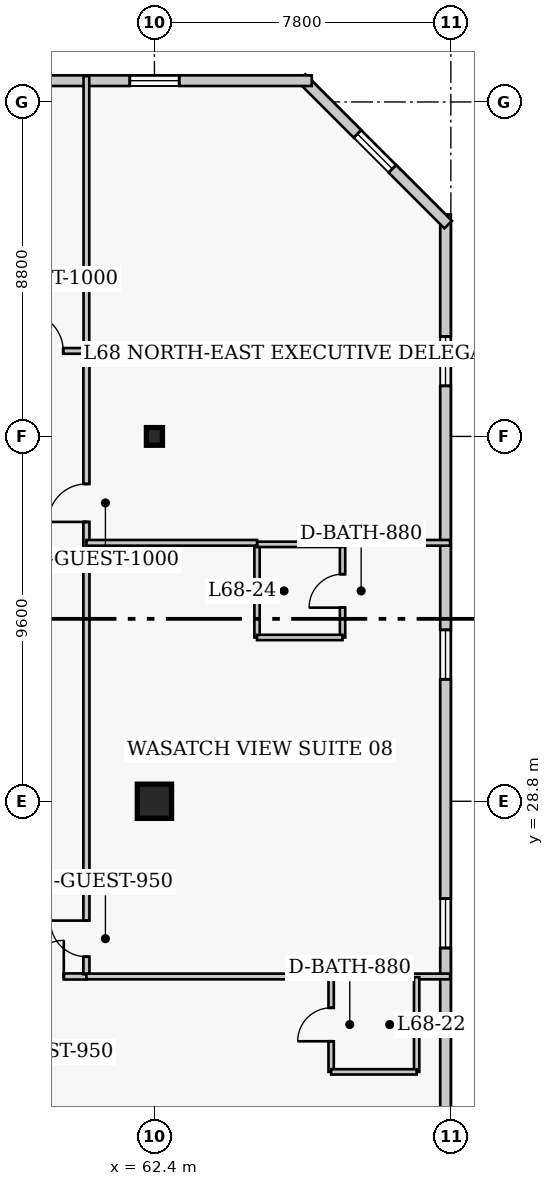
"""IFC4 building model, lengths in metres.
Left out: names, types, materials, properties, quantities, classifications, styles, units other than length and angle.
Written with IfcOpenShell. Run it as: python <this file> out.ifc"""

import sys

from ifc_helpers import new_model, si_unit, direction, frame, frame_2d, origin, origin_2d, place, context, subcontext, project, spatial, rectangle, i_section, extrude, element, fill, save


model = new_model("IFC4")
c1 = context("Model", 3, precision=1e-05, world=origin(), true_north=direction((0.0, 1.0)))
c2 = subcontext(c1, "Body", "Model", "MODEL_VIEW")
j1 = project(units=[si_unit("LENGTHUNIT", "METRE"), si_unit("PLANEANGLEUNIT", "RADIAN")], contexts=[c1])
p1 = place(None, origin())
s1 = spatial("IfcSite", under=j1, at=p1, CompositionType="ELEMENT")
p2 = place(p1, origin())
s2 = spatial("IfcBuilding", under=s1, at=p2, CompositionType="ELEMENT")
p3 = place(p2, frame((0.0, 0.0, 273.4)))
s3 = spatial("IfcBuildingStorey", under=s2, at=p3, CompositionType="ELEMENT", Elevation=273.4)
p4 = place(p3, frame((62.4, 28.8, 0.0), z_axis=(0.0, 0.0, 1.0), x_axis=(1.0, 0.0, 0.0)))
e1 = element("IfcColumn", 1, at=p4, inside=s3, PredefinedType="COLUMN", context=c2, shape_type="SweptSolid", body=[
    extrude(rectangle(XDim=0.9, YDim=0.9, at=origin_2d()), origin(), (0.0, 0.0, 1.0), 4.0),
])
p5 = place(p3, frame((62.4, 38.4, 0.0), z_axis=(0.0, 0.0, 1.0), x_axis=(1.0, 0.0, 0.0)))
e2 = element("IfcColumn", 2, at=p5, inside=s3, PredefinedType="COLUMN", context=c2, shape_type="SweptSolid", body=[
    extrude(i_section(OverallWidth=0.422, OverallDepth=0.465, WebThickness=0.045, FlangeThickness=0.073, FilletRadius=0.017, at=origin_2d()), origin(), (0.0, 0.0, 1.0), 4.0),
])
p6 = place(p3, frame((70.06, 13.36, 0.0), z_axis=(0.0, 0.0, 1.0), x_axis=(0.0, 1.0, 0.0)))
e3 = element("IfcWall", 3, at=p6, inside=s3, PredefinedType="SOLIDWALL", context=c2, shape_type="SweptSolid", body=[
    extrude(rectangle(XDim=30.88, YDim=0.28, at=frame_2d((15.44, 0.0))), origin(), (0.0, 0.0, 1.0), 3.76),
])
p7 = place(p6, frame((3.21, 0.0, 0.85)))
e4 = element("IfcOpeningElement", 4, at=p7, cuts=e3, PredefinedType="OPENING", context=c2, shape_type="SweptSolid", body=[
    extrude(rectangle(XDim=1.3, YDim=1.7, at=frame_2d((0.65, 0.85))), frame((0.0, 0.15, 0.0), z_axis=(0.0, -1.0, 0.0), x_axis=(1.0, 0.0, 0.0)), (0.0, 0.0, 1.0), 0.3),
])
p8 = place(p6, frame((11.58, 0.0, 0.85)))
e5 = element("IfcOpeningElement", 5, at=p8, cuts=e3, PredefinedType="OPENING", context=c2, shape_type="SweptSolid", body=[
    extrude(rectangle(XDim=1.3, YDim=1.7, at=frame_2d((0.65, 0.85))), frame((0.0, 0.15, 0.0), z_axis=(0.0, -1.0, 0.0), x_axis=(1.0, 0.0, 0.0)), (0.0, 0.0, 1.0), 0.3),
])
p9 = place(p6, frame((18.65, 0.0, 0.85)))
e6 = element("IfcOpeningElement", 6, at=p9, cuts=e3, PredefinedType="OPENING", context=c2, shape_type="SweptSolid", body=[
    extrude(rectangle(XDim=1.3, YDim=1.7, at=frame_2d((0.65, 0.85))), frame((0.0, 0.15, 0.0), z_axis=(0.0, -1.0, 0.0), x_axis=(1.0, 0.0, 0.0)), (0.0, 0.0, 1.0), 0.3),
])
p10 = place(p6, frame((26.37, 0.0, 0.85)))
e7 = element("IfcOpeningElement", 7, at=p10, cuts=e3, PredefinedType="OPENING", context=c2, shape_type="SweptSolid", body=[
    extrude(rectangle(XDim=1.3, YDim=1.7, at=frame_2d((0.65, 0.85))), frame((0.0, 0.15, 0.0), z_axis=(0.0, -1.0, 0.0), x_axis=(1.0, 0.0, 0.0)), (0.0, 0.0, 1.0), 0.3),
])
p11 = place(p3, frame((70.129, 43.973, 0.0), z_axis=(0.0, 0.0, 1.0), x_axis=(-0.707106781187, 0.707106781187, 0.0)))
e8 = element("IfcWall", 8, at=p11, inside=s3, PredefinedType="SOLIDWALL", context=c2, shape_type="SweptSolid", body=[
    extrude(rectangle(XDim=5.454, YDim=0.28, at=frame_2d((2.727, 0.0))), origin(), (0.0, 0.0, 1.0), 3.76),
])
p12 = place(p11, frame((2.077, 0.0, 0.85)))
e9 = element("IfcOpeningElement", 9, at=p12, cuts=e8, PredefinedType="OPENING", context=c2, shape_type="SweptSolid", body=[
    extrude(rectangle(XDim=1.3, YDim=1.7, at=frame_2d((0.65, 0.85))), frame((0.0, 0.15, 0.0), z_axis=(0.0, -1.0, 0.0), x_axis=(1.0, 0.0, 0.0)), (0.0, 0.0, 1.0), 0.3),
])
p13 = place(p3, frame((66.54, 47.76, 0.0), z_axis=(0.0, 0.0, 1.0), x_axis=(-1.0, 0.0, 0.0)))
e10 = element("IfcWall", 10, at=p13, inside=s3, PredefinedType="SOLIDWALL", context=c2, shape_type="SweptSolid", body=[
    extrude(rectangle(XDim=24.83, YDim=0.28, at=frame_2d((12.415, 0.0))), origin(), (0.0, 0.0, 1.0), 3.76),
])
p14 = place(p13, frame((3.488, 0.0, 0.85)))
e11 = element("IfcOpeningElement", 11, at=p14, cuts=e10, PredefinedType="OPENING", context=c2, shape_type="SweptSolid", body=[
    extrude(rectangle(XDim=1.3, YDim=1.7, at=frame_2d((0.65, 0.85))), frame((0.0, 0.15, 0.0), z_axis=(0.0, -1.0, 0.0), x_axis=(1.0, 0.0, 0.0)), (0.0, 0.0, 1.0), 0.3),
])
p15 = place(p13, frame((12.915, 0.0, 0.85)))
e12 = element("IfcOpeningElement", 12, at=p15, cuts=e10, PredefinedType="OPENING", context=c2, shape_type="SweptSolid", body=[
    extrude(rectangle(XDim=1.3, YDim=1.7, at=frame_2d((0.65, 0.85))), frame((0.0, 0.15, 0.0), z_axis=(0.0, -1.0, 0.0), x_axis=(1.0, 0.0, 0.0)), (0.0, 0.0, 1.0), 0.3),
])
p16 = place(p13, frame((20.692, 0.0, 0.85)))
e13 = element("IfcOpeningElement", 13, at=p16, cuts=e10, PredefinedType="OPENING", context=c2, shape_type="SweptSolid", body=[
    extrude(rectangle(XDim=1.3, YDim=1.7, at=frame_2d((0.65, 0.85))), frame((0.0, 0.15, 0.0), z_axis=(0.0, -1.0, 0.0), x_axis=(1.0, 0.0, 0.0)), (0.0, 0.0, 1.0), 0.3),
])
p17 = place(p3, frame((35.8, 24.19, 0.0), z_axis=(0.0, 0.0, 1.0), x_axis=(1.0, 0.0, 0.0)))
e14 = element("IfcWall", 14, at=p17, inside=s3, PredefinedType="PARTITIONING", context=c2, shape_type="SweptSolid", body=[
    extrude(rectangle(XDim=24.81, YDim=0.16, at=frame_2d((12.405, 0.0))), origin(), (0.0, 0.0, 1.0), 3.76),
])
p18 = place(p17, frame((2.115, 0.0, 0.0)))
e15 = element("IfcOpeningElement", 15, at=p18, cuts=e14, PredefinedType="OPENING", context=c2, shape_type="SweptSolid", body=[
    extrude(rectangle(XDim=0.95, YDim=2.1, at=frame_2d((0.475, 1.05))), frame((0.0, 0.09, 0.0), z_axis=(0.0, -1.0, 0.0), x_axis=(1.0, 0.0, 0.0)), (0.0, 0.0, 1.0), 0.18),
])
p19 = place(p17, frame((11.345, 0.0, 0.0)))
e16 = element("IfcOpeningElement", 16, at=p19, cuts=e14, PredefinedType="OPENING", context=c2, shape_type="SweptSolid", body=[
    extrude(rectangle(XDim=1.0, YDim=2.15, at=frame_2d((0.5, 1.075))), frame((0.0, 0.09, 0.0), z_axis=(0.0, -1.0, 0.0), x_axis=(1.0, 0.0, 0.0)), (0.0, 0.0, 1.0), 0.18),
])
p20 = place(p17, frame((17.47, 0.0, 0.0)))
e17 = element("IfcOpeningElement", 17, at=p20, cuts=e14, PredefinedType="OPENING", context=c2, shape_type="SweptSolid", body=[
    extrude(rectangle(XDim=0.95, YDim=2.1, at=frame_2d((0.475, 1.05))), frame((0.0, 0.09, 0.0), z_axis=(0.0, -1.0, 0.0), x_axis=(1.0, 0.0, 0.0)), (0.0, 0.0, 1.0), 0.18),
])
p21 = place(p17, frame((23.265, 0.0, 0.0)))
e18 = element("IfcOpeningElement", 18, at=p21, cuts=e14, PredefinedType="OPENING", context=c2, shape_type="SweptSolid", body=[
    extrude(rectangle(XDim=0.95, YDim=2.1, at=frame_2d((0.475, 1.05))), frame((0.0, 0.09, 0.0), z_axis=(0.0, -1.0, 0.0), x_axis=(1.0, 0.0, 0.0)), (0.0, 0.0, 1.0), 0.18),
])
p22 = place(p3, frame((60.61, 24.25, 0.0), z_axis=(0.0, 0.0, 1.0), x_axis=(0.0, 1.0, 0.0)))
e19 = element("IfcWall", 19, at=p22, inside=s3, PredefinedType="PARTITIONING", context=c2, shape_type="SweptSolid", body=[
    extrude(rectangle(XDim=16.4, YDim=0.16, at=frame_2d((8.2, 0.0))), origin(), (0.0, 0.0, 1.0), 3.76),
])
p23 = place(p22, frame((0.46, 0.0, 0.0)))
e20 = element("IfcOpeningElement", 20, at=p23, cuts=e19, PredefinedType="OPENING", context=c2, shape_type="SweptSolid", body=[
    extrude(rectangle(XDim=0.95, YDim=2.1, at=frame_2d((0.475, 1.05))), frame((0.0, 0.09, 0.0), z_axis=(0.0, -1.0, 0.0), x_axis=(1.0, 0.0, 0.0)), (0.0, 0.0, 1.0), 0.18),
])
p24 = place(p22, frame((11.9, 0.0, 0.0)))
e21 = element("IfcOpeningElement", 21, at=p24, cuts=e19, PredefinedType="OPENING", context=c2, shape_type="SweptSolid", body=[
    extrude(rectangle(XDim=1.0, YDim=2.15, at=frame_2d((0.5, 1.075))), frame((0.0, 0.09, 0.0), z_axis=(0.0, -1.0, 0.0), x_axis=(1.0, 0.0, 0.0)), (0.0, 0.0, 1.0), 0.18),
])
p25 = place(p3, frame((56.8, 40.65, 0.0), z_axis=(0.0, 0.0, 1.0), x_axis=(1.0, 0.0, 0.0)))
e22 = element("IfcWall", 22, at=p25, inside=s3, PredefinedType="PARTITIONING", context=c2, shape_type="SweptSolid", body=[
    extrude(rectangle(XDim=3.81, YDim=0.15, at=frame_2d((1.905, 0.0))), origin(), (0.0, 0.0, 1.0), 3.76),
])
p26 = place(p25, frame((2.2, 0.0, 0.0)))
e23 = element("IfcOpeningElement", 23, at=p26, cuts=e22, PredefinedType="OPENING", context=c2, shape_type="SweptSolid", body=[
    extrude(rectangle(XDim=1.0, YDim=2.15, at=frame_2d((0.5, 1.075))), frame((0.0, 0.085, 0.0), z_axis=(0.0, -1.0, 0.0), x_axis=(1.0, 0.0, 0.0)), (0.0, 0.0, 1.0), 0.17),
])
p27 = place(p3, frame((60.61, 40.65, 0.0), z_axis=(0.0, 0.0, 1.0), x_axis=(0.0, 1.0, 0.0)))
e24 = element("IfcWall", 24, at=p27, inside=s3, PredefinedType="PARTITIONING", context=c2, shape_type="SweptSolid", body=[
    extrude(rectangle(XDim=7.23, YDim=0.15, at=frame_2d((3.615, 0.0))), origin(), (0.0, 0.0, 1.0), 3.76),
])
p28 = place(p3, frame((60.61, 24.19, 0.0), z_axis=(0.0, 0.0, 1.0), x_axis=(1.0, 0.0, 0.0)))
e25 = element("IfcWall", 25, at=p28, inside=s3, PredefinedType="PARTITIONING", context=c2, shape_type="SweptSolid", body=[
    extrude(rectangle(XDim=9.57, YDim=0.15, at=frame_2d((4.785, 0.0))), origin(), (0.0, 0.0, 1.0), 3.76),
])
p29 = place(p3, frame((67.05, 21.68, 0.0), z_axis=(0.0, 0.0, 1.0), x_axis=(0.0, 1.0, 0.0)))
e26 = element("IfcWall", 26, at=p29, inside=s3, PredefinedType="PLUMBINGWALL", context=c2, shape_type="SweptSolid", body=[
    extrude(rectangle(XDim=2.49, YDim=0.14, at=frame_2d((1.245, 0.0))), origin(), (0.0, 0.0, 1.0), 3.76),
])
p30 = place(p29, frame((0.805, 0.0, 0.0)))
e27 = element("IfcOpeningElement", 27, at=p30, cuts=e26, PredefinedType="OPENING", context=c2, shape_type="SweptSolid", body=[
    extrude(rectangle(XDim=0.88, YDim=2.05, at=frame_2d((0.44, 1.025))), frame((0.0, 0.08, 0.0), z_axis=(0.0, -1.0, 0.0), x_axis=(1.0, 0.0, 0.0)), (0.0, 0.0, 1.0), 0.16),
])
p31 = place(p3, frame((69.3, 21.68, 0.0), z_axis=(0.0, 0.0, 1.0), x_axis=(0.0, 1.0, 0.0)))
e28 = element("IfcWall", 28, at=p31, inside=s3, PredefinedType="PLUMBINGWALL", context=c2, shape_type="SweptSolid", body=[
    extrude(rectangle(XDim=2.49, YDim=0.14, at=frame_2d((1.245, 0.0))), origin(), (0.0, 0.0, 1.0), 3.76),
])
p32 = place(p3, frame((67.05, 21.68, 0.0), z_axis=(0.0, 0.0, 1.0), x_axis=(1.0, 0.0, 0.0)))
e29 = element("IfcWall", 29, at=p32, inside=s3, PredefinedType="PLUMBINGWALL", context=c2, shape_type="SweptSolid", body=[
    extrude(rectangle(XDim=2.25, YDim=0.14, at=frame_2d((1.125, 0.0))), origin(), (0.0, 0.0, 1.0), 3.76),
])
p33 = place(p3, frame((65.1, 33.11, 0.0), z_axis=(0.0, 0.0, 1.0), x_axis=(0.0, 1.0, 0.0)))
e30 = element("IfcWall", 30, at=p33, inside=s3, PredefinedType="PLUMBINGWALL", context=c2, shape_type="SweptSolid", body=[
    extrude(rectangle(XDim=2.45, YDim=0.14, at=frame_2d((1.225, 0.0))), origin(), (0.0, 0.0, 1.0), 3.76),
])
p34 = place(p3, frame((67.35, 33.11, 0.0), z_axis=(0.0, 0.0, 1.0), x_axis=(0.0, 1.0, 0.0)))
e31 = element("IfcWall", 31, at=p34, inside=s3, PredefinedType="PLUMBINGWALL", context=c2, shape_type="SweptSolid", body=[
    extrude(rectangle(XDim=2.45, YDim=0.14, at=frame_2d((1.225, 0.0))), origin(), (0.0, 0.0, 1.0), 3.76),
])
p35 = place(p34, frame((0.785, 0.0, 0.0)))
e32 = element("IfcOpeningElement", 32, at=p35, cuts=e31, PredefinedType="OPENING", context=c2, shape_type="SweptSolid", body=[
    extrude(rectangle(XDim=0.88, YDim=2.05, at=frame_2d((0.44, 1.025))), frame((0.0, 0.08, 0.0), z_axis=(0.0, -1.0, 0.0), x_axis=(1.0, 0.0, 0.0)), (0.0, 0.0, 1.0), 0.16),
])
for number, where, z_axis, x_axis in (
    (33, (65.1, 33.11, 0.0), (0.0, 0.0, 1.0), (1.0, 0.0, 0.0)),
    (34, (65.1, 35.56, 0.0), (0.0, 0.0, 1.0), (1.0, 0.0, 0.0)),
):
    element("IfcWall", number, at=place(p3, frame(where, z_axis=z_axis, x_axis=x_axis)), inside=s3, PredefinedType="PLUMBINGWALL", context=c2, shape_type="SweptSolid", body=[
        extrude(rectangle(XDim=2.25, YDim=0.14, at=frame_2d((1.125, 0.0))), origin(), (0.0, 0.0, 1.0), 3.76),
    ])
p36 = place(p3, frame((60.61, 35.6, 0.0), z_axis=(0.0, 0.0, 1.0), x_axis=(1.0, 0.0, 0.0)))
e35 = element("IfcWall", 35, at=p36, inside=s3, PredefinedType="PARTITIONING", context=c2, shape_type="SweptSolid", body=[
    extrude(rectangle(XDim=4.49, YDim=0.15, at=frame_2d((2.245, 0.0))), origin(), (0.0, 0.0, 1.0), 3.76),
])
p37 = place(p3, frame((67.35, 35.6, 0.0), z_axis=(0.0, 0.0, 1.0), x_axis=(1.0, 0.0, 0.0)))
e36 = element("IfcWall", 36, at=p37, inside=s3, PredefinedType="PARTITIONING", context=c2, shape_type="SweptSolid", body=[
    extrude(rectangle(XDim=2.83, YDim=0.15, at=frame_2d((1.415, 0.0))), origin(), (0.0, 0.0, 1.0), 3.76),
])
p38 = place(p8, origin())
e37 = element("IfcWindow", 37, at=p38, inside=s3, PartitioningType="SINGLE_PANEL", PredefinedType="WINDOW", context=c2, shape_type="SweptSolid", body=[
    extrude(rectangle(XDim=1.3, YDim=1.7, at=frame_2d((0.65, 0.85))), frame((0.0, 0.03, 0.0), z_axis=(0.0, -1.0, 0.0), x_axis=(1.0, 0.0, 0.0)), (0.0, 0.0, 1.0), 0.06),
])
fill(e5, e37)
p39 = place(p9, origin())
e38 = element("IfcWindow", 38, at=p39, inside=s3, PartitioningType="SINGLE_PANEL", PredefinedType="WINDOW", context=c2, shape_type="SweptSolid", body=[
    extrude(rectangle(XDim=1.3, YDim=1.7, at=frame_2d((0.65, 0.85))), frame((0.0, 0.03, 0.0), z_axis=(0.0, -1.0, 0.0), x_axis=(1.0, 0.0, 0.0)), (0.0, 0.0, 1.0), 0.06),
])
fill(e6, e38)
p40 = place(p10, origin())
e39 = element("IfcWindow", 39, at=p40, inside=s3, PartitioningType="SINGLE_PANEL", PredefinedType="WINDOW", context=c2, shape_type="SweptSolid", body=[
    extrude(rectangle(XDim=1.3, YDim=1.7, at=frame_2d((0.65, 0.85))), frame((0.0, 0.03, 0.0), z_axis=(0.0, -1.0, 0.0), x_axis=(1.0, 0.0, 0.0)), (0.0, 0.0, 1.0), 0.06),
])
fill(e7, e39)
p41 = place(p12, origin())
e40 = element("IfcWindow", 40, at=p41, inside=s3, PartitioningType="SINGLE_PANEL", PredefinedType="WINDOW", context=c2, shape_type="SweptSolid", body=[
    extrude(rectangle(XDim=1.3, YDim=1.7, at=frame_2d((0.65, 0.85))), frame((0.0, 0.03, 0.0), z_axis=(0.0, -1.0, 0.0), x_axis=(1.0, 0.0, 0.0)), (0.0, 0.0, 1.0), 0.06),
])
fill(e9, e40)
p42 = place(p14, origin())
e41 = element("IfcWindow", 41, at=p42, inside=s3, PartitioningType="SINGLE_PANEL", PredefinedType="WINDOW", context=c2, shape_type="SweptSolid", body=[
    extrude(rectangle(XDim=1.3, YDim=1.7, at=frame_2d((0.65, 0.85))), frame((0.0, 0.03, 0.0), z_axis=(0.0, -1.0, 0.0), x_axis=(1.0, 0.0, 0.0)), (0.0, 0.0, 1.0), 0.06),
])
fill(e11, e41)
p43 = place(p26, origin())
e42 = element("IfcDoor", 42, at=p43, inside=s3, OperationType="SINGLE_SWING_LEFT", PredefinedType="DOOR", context=c2, shape_type="SweptSolid", body=[
    extrude(rectangle(XDim=1.0, YDim=2.15, at=frame_2d((0.5, 1.075))), frame((0.0, 0.025, 0.0), z_axis=(0.0, -1.0, 0.0), x_axis=(1.0, 0.0, 0.0)), (0.0, 0.0, 1.0), 0.05),
])
fill(e23, e42)
p44 = place(p30, origin())
e43 = element("IfcDoor", 43, at=p44, inside=s3, OperationType="SINGLE_SWING_LEFT", PredefinedType="DOOR", context=c2, shape_type="SweptSolid", body=[
    extrude(rectangle(XDim=0.88, YDim=2.05, at=frame_2d((0.44, 1.025))), frame((0.0, 0.025, 0.0), z_axis=(0.0, -1.0, 0.0), x_axis=(1.0, 0.0, 0.0)), (0.0, 0.0, 1.0), 0.05),
])
fill(e27, e43)
p45 = place(p21, origin())
e44 = element("IfcDoor", 44, at=p45, inside=s3, OperationType="SINGLE_SWING_RIGHT", PredefinedType="DOOR", context=c2, shape_type="SweptSolid", body=[
    extrude(rectangle(XDim=0.95, YDim=2.1, at=frame_2d((0.475, 1.05))), frame((0.0, 0.025, 0.0), z_axis=(0.0, -1.0, 0.0), x_axis=(1.0, 0.0, 0.0)), (0.0, 0.0, 1.0), 0.05),
])
fill(e18, e44)
p46 = place(p35, origin())
e45 = element("IfcDoor", 45, at=p46, inside=s3, OperationType="SINGLE_SWING_LEFT", PredefinedType="DOOR", context=c2, shape_type="SweptSolid", body=[
    extrude(rectangle(XDim=0.88, YDim=2.05, at=frame_2d((0.44, 1.025))), frame((0.0, 0.025, 0.0), z_axis=(0.0, -1.0, 0.0), x_axis=(1.0, 0.0, 0.0)), (0.0, 0.0, 1.0), 0.05),
])
fill(e32, e45)
p47 = place(p23, origin())
e46 = element("IfcDoor", 46, at=p47, inside=s3, OperationType="SINGLE_SWING_RIGHT", PredefinedType="DOOR", context=c2, shape_type="SweptSolid", body=[
    extrude(rectangle(XDim=0.95, YDim=2.1, at=frame_2d((0.475, 1.05))), frame((0.0, 0.025, 0.0), z_axis=(0.0, -1.0, 0.0), x_axis=(1.0, 0.0, 0.0)), (0.0, 0.0, 1.0), 0.05),
])
fill(e20, e46)
p48 = place(p24, origin())
e47 = element("IfcDoor", 47, at=p48, inside=s3, OperationType="SINGLE_SWING_LEFT", PredefinedType="DOOR", context=c2, shape_type="SweptSolid", body=[
    extrude(rectangle(XDim=1.0, YDim=2.15, at=frame_2d((0.5, 1.075))), frame((0.0, 0.025, 0.0), z_axis=(0.0, -1.0, 0.0), x_axis=(1.0, 0.0, 0.0)), (0.0, 0.0, 1.0), 0.05),
])
fill(e21, e47)
save(model, sys.argv[1])
